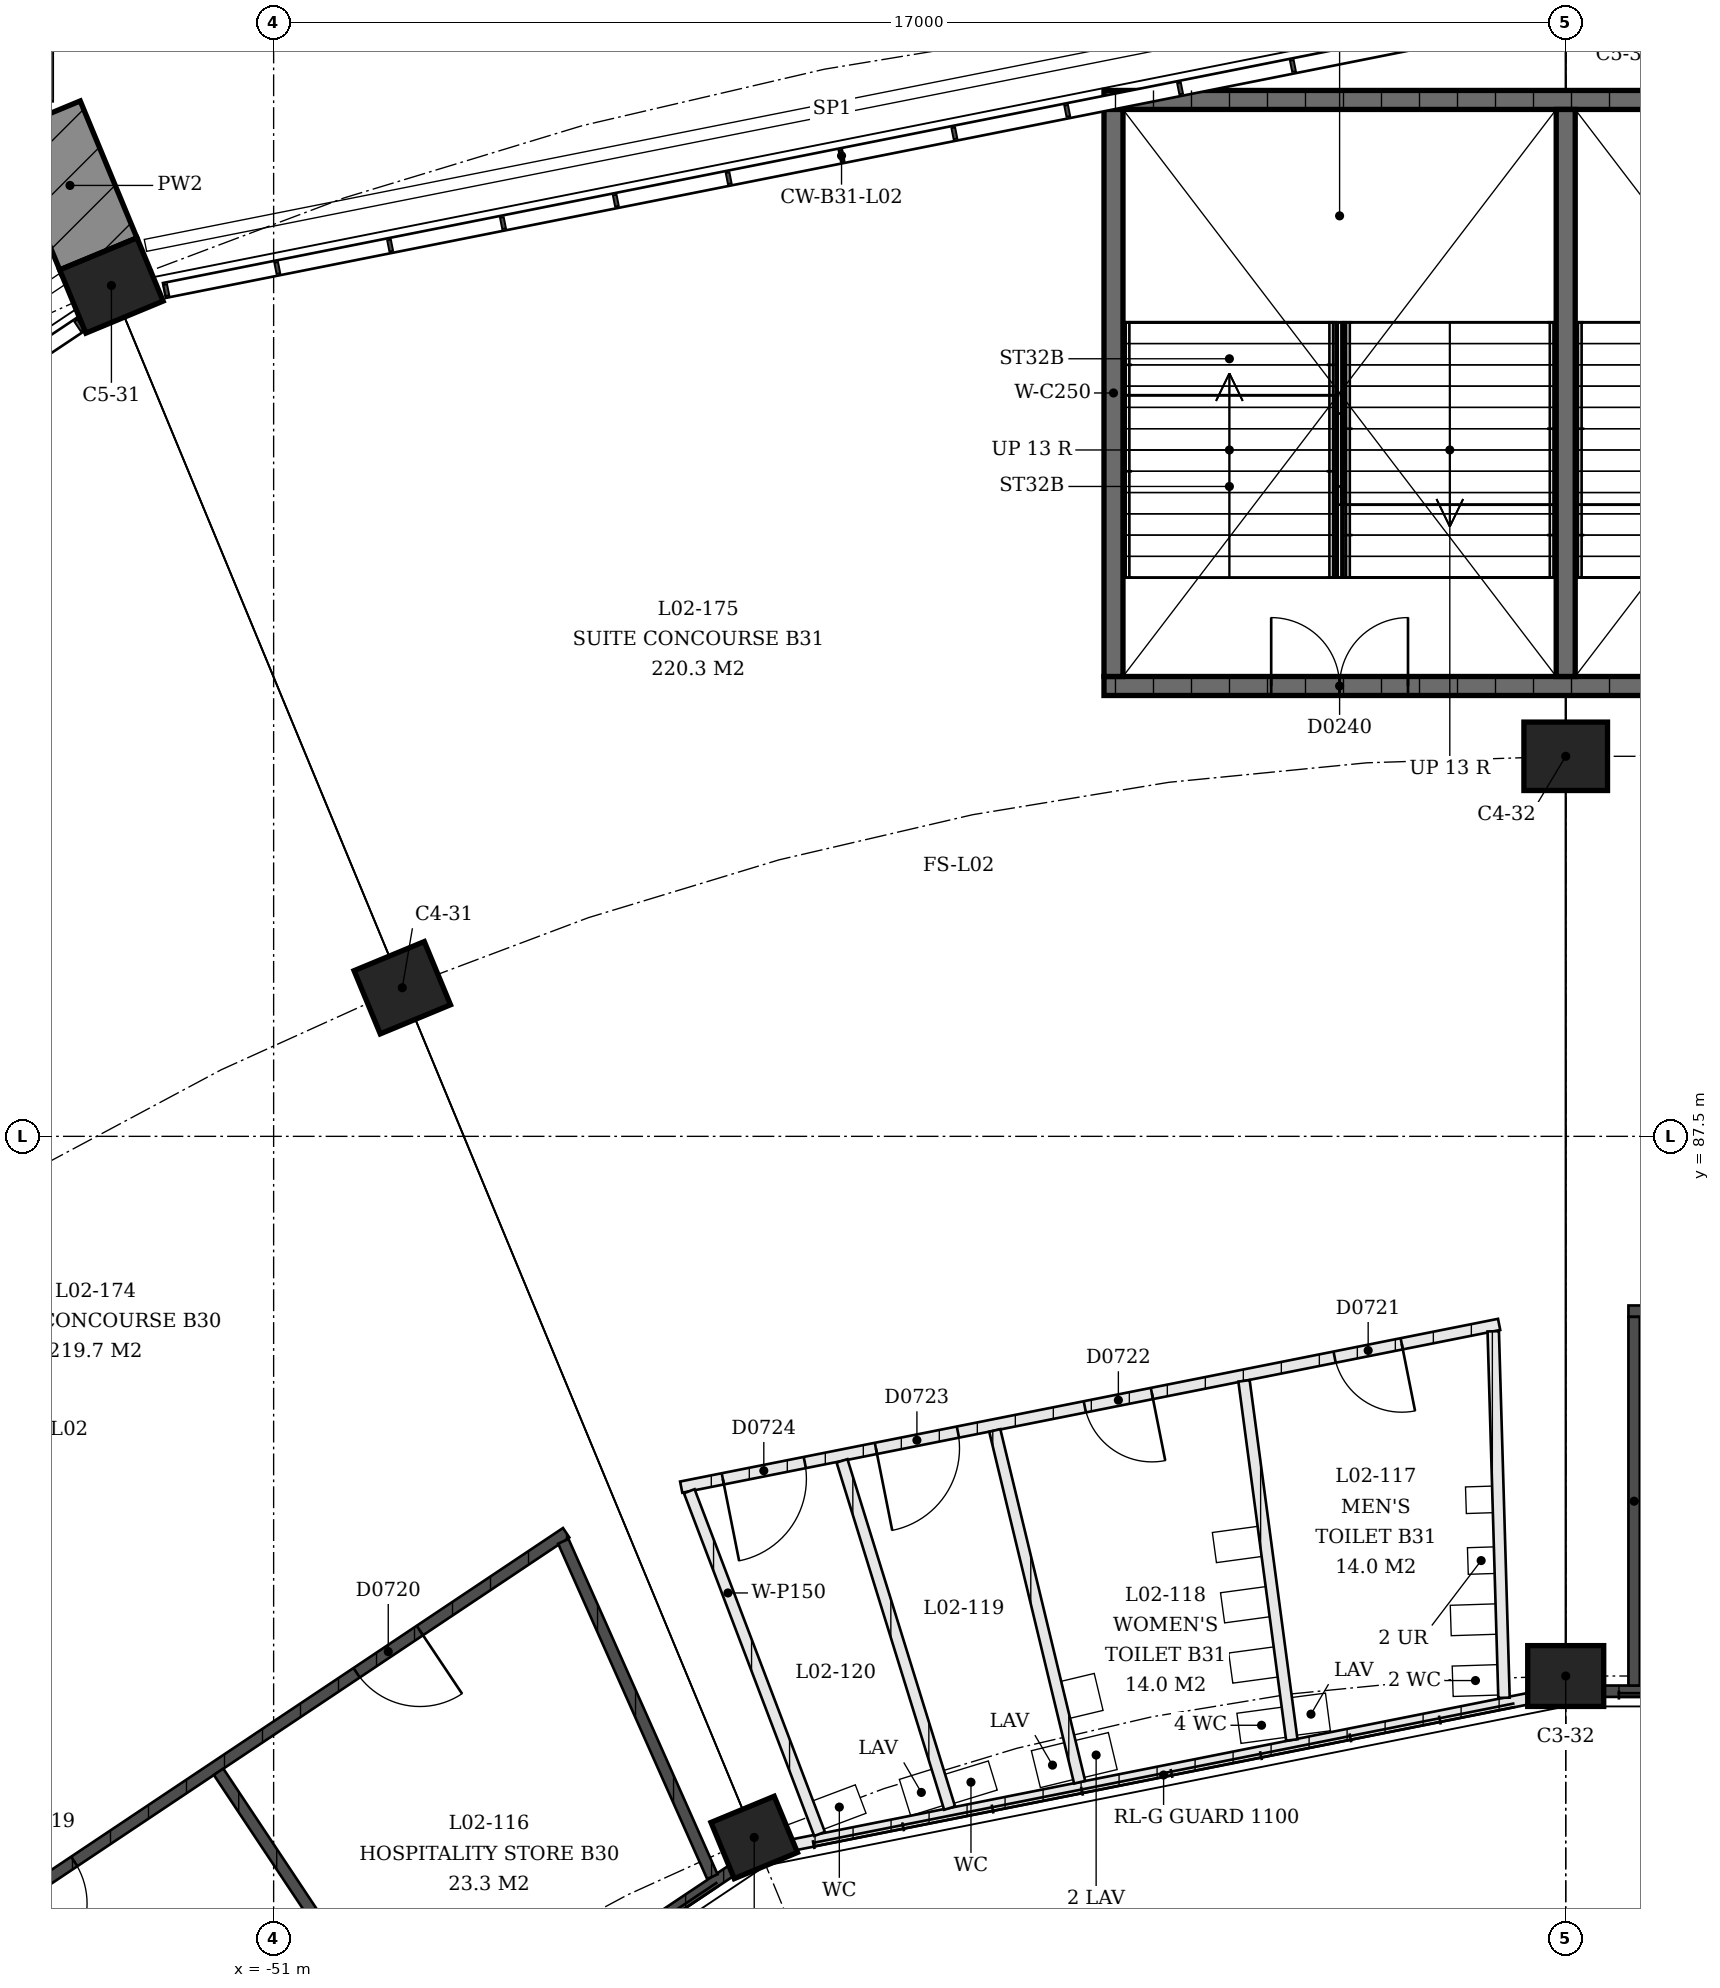
"""IFC4 building model, lengths in metres.
Left out: names, types, materials, properties, quantities, classifications, styles, units other than length and angle.
Written with IfcOpenShell. Run it as: python <this file> out.ifc"""

import sys

from ifc_helpers import new_model, si_unit, direction, frame, frame_2d, origin, origin_2d, place, context, subcontext, project, spatial, rectangle, extrude, element, fill, save


model = new_model("IFC4")
c1 = context("Model", 3, precision=1e-05, world=origin(), true_north=direction((0.0, 1.0)))
c2 = subcontext(c1, "Body", "Model", "MODEL_VIEW")
j1 = project(units=[si_unit("LENGTHUNIT", "METRE"), si_unit("PLANEANGLEUNIT", "RADIAN")], contexts=[c1])
p1 = place(None, origin())
s1 = spatial("IfcSite", under=j1, at=p1, CompositionType="ELEMENT")
p2 = place(p1, origin())
s2 = spatial("IfcBuilding", under=s1, at=p2, CompositionType="ELEMENT")
p3 = place(p2, frame((0.0, 0.0, 9.0)))
s3 = spatial("IfcBuildingStorey", under=s2, at=p3, CompositionType="ELEMENT", Elevation=9.0)
p4 = place(p3, frame((-44.677, 78.276, 0.0), z_axis=(0.0, 0.0, 1.0), x_axis=(-0.923879532511, -0.382683432365, 0.0)))
e1 = element("IfcColumn", 1, at=p4, inside=s3, PredefinedType="COLUMN", context=c2, shape_type="SweptSolid", body=[
    extrude(rectangle(XDim=0.9, YDim=0.8, at=origin_2d()), origin(), (0.0, 0.0, 1.0), 4.5),
])
p5 = place(p3, frame((-49.307, 89.455, 0.0), z_axis=(0.0, 0.0, 1.0), x_axis=(-0.923879532511, -0.382683432365, 0.0)))
e2 = element("IfcColumn", 2, at=p5, inside=s3, PredefinedType="COLUMN", context=c2, shape_type="SweptSolid", body=[
    extrude(rectangle(XDim=1.0, YDim=0.9, at=origin_2d()), origin(), (0.0, 0.0, 1.0), 4.5),
])
p6 = place(p3, frame((-53.134, 98.694, 0.0), z_axis=(0.0, 0.0, 1.0), x_axis=(-0.923879532511, -0.382683432365, 0.0)))
e3 = element("IfcColumn", 3, at=p6, inside=s3, PredefinedType="COLUMN", context=c2, shape_type="SweptSolid", body=[
    extrude(rectangle(XDim=1.1, YDim=0.9, at=origin_2d()), origin(), (0.0, 0.0, 1.0), 4.5),
])
p7 = place(p3, frame((-34.0, 80.4, 0.0), z_axis=(0.0, 0.0, 1.0), x_axis=(-1.0, 0.0, 0.0)))
e4 = element("IfcColumn", 4, at=p7, inside=s3, PredefinedType="COLUMN", context=c2, shape_type="SweptSolid", body=[
    extrude(rectangle(XDim=1.0, YDim=0.8, at=origin_2d()), origin(), (0.0, 0.0, 1.0), 4.5),
])
p8 = place(p3, frame((-34.0, 92.5, 0.0), z_axis=(0.0, 0.0, 1.0), x_axis=(-1.0, 0.0, 0.0)))
e5 = element("IfcColumn", 5, at=p8, inside=s3, PredefinedType="COLUMN", context=c2, shape_type="SweptSolid", body=[
    extrude(rectangle(XDim=1.1, YDim=0.9, at=origin_2d()), origin(), (0.0, 0.0, 1.0), 4.5),
])
p9 = place(p3, frame((-27.925, 93.425, 0.0), z_axis=(0.0, 0.0, 1.0), x_axis=(-1.0, 0.0, 0.0)))
e6 = element("IfcWall", 6, at=p9, inside=s3, PredefinedType="SHEAR", context=c2, shape_type="SweptSolid", body=[
    extrude(rectangle(XDim=12.15, YDim=0.25, at=frame_2d((6.075, 0.0))), origin(), (0.0, 0.0, 1.0), 4.09),
])
p10 = place(p9, frame((2.2, 0.0, 0.0)))
e7 = element("IfcOpeningElement", 7, at=p10, cuts=e6, PredefinedType="OPENING", context=c2, shape_type="SweptSolid", body=[
    extrude(rectangle(XDim=1.8, YDim=2.1, at=frame_2d((0.9, 1.05))), frame((0.0, 0.125, 0.0), z_axis=(0.0, -1.0, 0.0), x_axis=(1.0, 0.0, 0.0)), (0.0, 0.0, 1.0), 0.25),
])
p11 = place(p9, frame((8.15, 0.0, 0.0)))
e8 = element("IfcOpeningElement", 8, at=p11, cuts=e6, PredefinedType="OPENING", context=c2, shape_type="SweptSolid", body=[
    extrude(rectangle(XDim=1.8, YDim=2.1, at=frame_2d((0.9, 1.05))), frame((0.0, 0.125, 0.0), z_axis=(0.0, -1.0, 0.0), x_axis=(1.0, 0.0, 0.0)), (0.0, 0.0, 1.0), 0.25),
])
p12 = place(p3, frame((-27.925, 101.135, 0.0), z_axis=(0.0, 0.0, 1.0), x_axis=(-1.0, 0.0, 0.0)))
e9 = element("IfcWall", 9, at=p12, inside=s3, PredefinedType="SHEAR", context=c2, shape_type="SweptSolid", body=[
    extrude(rectangle(XDim=12.15, YDim=0.25, at=frame_2d((6.075, 0.0))), origin(), (0.0, 0.0, 1.0), 4.09),
])
for number, where, z_axis, x_axis in (
    (10, (-39.95, 93.55, 0.0), (0.0, 0.0, 1.0), (0.0, 1.0, 0.0)),
    (11, (-34.0, 93.55, 0.0), (0.0, 0.0, 1.0), (0.0, 1.0, 0.0)),
):
    element("IfcWall", number, at=place(p3, frame(where, z_axis=z_axis, x_axis=x_axis)), inside=s3, PredefinedType="SHEAR", context=c2, shape_type="SweptSolid", body=[
        extrude(rectangle(XDim=7.46, YDim=0.25, at=frame_2d((3.73, 0.0))), origin(), (0.0, 0.0, 1.0), 4.09),
    ])
p13 = place(p3, frame((-53.205, 72.342, 0.0), z_axis=(0.0, 0.0, 1.0), x_axis=(0.831461186136, 0.555582843463, 0.0)))
e12 = element("IfcWall", 12, at=p13, inside=s3, PredefinedType="SOLIDWALL", context=c2, shape_type="SweptSolid", body=[
    extrude(rectangle(XDim=9.89, YDim=0.15, at=frame_2d((4.945, 0.0))), origin(), (0.0, 0.0, 1.0), 3.0),
])
p14 = place(p3, frame((-56.38, 76.119, 0.0), z_axis=(0.0, 0.0, 1.0), x_axis=(0.831471162003, 0.555567913722, 0.0)))
e13 = element("IfcWall", 13, at=p14, inside=s3, PredefinedType="SOLIDWALL", context=c2, shape_type="SweptSolid", body=[
    extrude(rectangle(XDim=11.099, YDim=0.15, at=frame_2d((5.55, 0.0))), origin(), (0.0, 0.0, 1.0), 3.0),
])
p15 = place(p14, frame((2.315, 0.0, 0.0)))
e14 = element("IfcOpeningElement", 14, at=p15, cuts=e13, PredefinedType="OPENING", context=c2, shape_type="SweptSolid", body=[
    extrude(rectangle(XDim=1.0, YDim=2.1, at=frame_2d((0.5, 1.05))), frame((0.0, 0.075, 0.0), z_axis=(0.0, -1.0, 0.0), x_axis=(1.0, 0.0, 0.0)), (0.0, 0.0, 1.0), 0.15),
])
p16 = place(p14, frame((7.784, 0.0, 0.0)))
e15 = element("IfcOpeningElement", 15, at=p16, cuts=e13, PredefinedType="OPENING", context=c2, shape_type="SweptSolid", body=[
    extrude(rectangle(XDim=1.0, YDim=2.1, at=frame_2d((0.5, 1.05))), frame((0.0, 0.075, 0.0), z_axis=(0.0, -1.0, 0.0), x_axis=(1.0, 0.0, 0.0)), (0.0, 0.0, 1.0), 0.15),
])
p17 = place(p3, frame((-49.09, 75.18, 0.0), z_axis=(0.0, 0.0, 1.0), x_axis=(-0.553930112441, 0.832563169093, 0.0)))
e16 = element("IfcWall", 16, at=p17, inside=s3, PredefinedType="SOLIDWALL", context=c2, shape_type="SweptSolid", body=[
    extrude(rectangle(XDim=4.757, YDim=0.15, at=frame_2d((2.378, 0.0))), origin(), (0.0, 0.0, 1.0), 3.0),
])
p18 = place(p3, frame((-45.228, 77.761, 0.0), z_axis=(0.0, 0.0, 1.0), x_axis=(-0.406147851791, 0.913807377124, 0.0)))
e17 = element("IfcWall", 17, at=p18, inside=s3, PredefinedType="SOLIDWALL", context=c2, shape_type="SweptSolid", body=[
    extrude(rectangle(XDim=4.827, YDim=0.15, at=frame_2d((2.414, 0.0))), origin(), (0.0, 0.0, 1.0), 3.0),
])
p19 = place(p3, frame((-34.5, 80.101, 0.0), z_axis=(0.0, 0.0, 1.0), x_axis=(-0.980783419557, -0.195099676887, 0.0)))
e18 = element("IfcWall", 18, at=p19, inside=s3, PredefinedType="PARTITIONING", context=c2, shape_type="SweptSolid", body=[
    extrude(rectangle(XDim=9.839, YDim=0.15, at=frame_2d((4.92, 0.0))), origin(), (0.0, 0.0, 1.0), 3.0),
])
p20 = place(p3, frame((-34.876, 85.026, 0.0), z_axis=(0.0, 0.0, 1.0), x_axis=(-0.980788934186, -0.195071952313, 0.0)))
e19 = element("IfcWall", 19, at=p20, inside=s3, PredefinedType="PARTITIONING", context=c2, shape_type="SweptSolid", body=[
    extrude(rectangle(XDim=10.972, YDim=0.15, at=frame_2d((5.486, 0.0))), origin(), (0.0, 0.0, 1.0), 3.0),
])
p21 = place(p20, frame((1.307, 0.0, 0.0)))
e20 = element("IfcOpeningElement", 20, at=p21, cuts=e19, PredefinedType="OPENING", context=c2, shape_type="SweptSolid", body=[
    extrude(rectangle(XDim=0.9, YDim=2.1, at=frame_2d((0.45, 1.05))), frame((0.0, 0.075, 0.0), z_axis=(0.0, -1.0, 0.0), x_axis=(1.0, 0.0, 0.0)), (0.0, 0.0, 1.0), 0.15),
])
p22 = place(p20, frame((4.658, 0.0, 0.0)))
e21 = element("IfcOpeningElement", 21, at=p22, cuts=e19, PredefinedType="OPENING", context=c2, shape_type="SweptSolid", body=[
    extrude(rectangle(XDim=0.9, YDim=2.1, at=frame_2d((0.45, 1.05))), frame((0.0, 0.075, 0.0), z_axis=(0.0, -1.0, 0.0), x_axis=(1.0, 0.0, 0.0)), (0.0, 0.0, 1.0), 0.15),
])
p23 = place(p20, frame((7.26, 0.0, 0.0)))
e22 = element("IfcOpeningElement", 22, at=p23, cuts=e19, PredefinedType="OPENING", context=c2, shape_type="SweptSolid", body=[
    extrude(rectangle(XDim=1.1, YDim=2.1, at=frame_2d((0.55, 1.05))), frame((0.0, 0.075, 0.0), z_axis=(0.0, -1.0, 0.0), x_axis=(1.0, 0.0, 0.0)), (0.0, 0.0, 1.0), 0.15),
])
p24 = place(p20, frame((9.314, 0.0, 0.0)))
e23 = element("IfcOpeningElement", 23, at=p24, cuts=e19, PredefinedType="OPENING", context=c2, shape_type="SweptSolid", body=[
    extrude(rectangle(XDim=1.1, YDim=2.1, at=frame_2d((0.55, 1.05))), frame((0.0, 0.075, 0.0), z_axis=(0.0, -1.0, 0.0), x_axis=(1.0, 0.0, 0.0)), (0.0, 0.0, 1.0), 0.15),
])
p25 = place(p3, frame((-34.812, 80.114, 0.0), z_axis=(0.0, 0.0, 1.0), x_axis=(-0.029405000692, 0.999567579473, 0.0)))
e24 = element("IfcWall", 24, at=p25, inside=s3, PredefinedType="PARTITIONING", context=c2, shape_type="SweptSolid", body=[
    extrude(rectangle(XDim=4.824, YDim=0.15, at=frame_2d((2.412, 0.0))), origin(), (0.0, 0.0, 1.0), 3.0),
])
p26 = place(p3, frame((-37.604, 79.558, 0.0), z_axis=(0.0, 0.0, 1.0), x_axis=(-0.131992613728, 0.991250699834, 0.0)))
e25 = element("IfcWall", 25, at=p26, inside=s3, PredefinedType="PARTITIONING", context=c2, shape_type="SweptSolid", body=[
    extrude(rectangle(XDim=4.767, YDim=0.15, at=frame_2d((2.383, 0.0))), origin(), (0.0, 0.0, 1.0), 3.0),
])
p27 = place(p3, frame((-40.395, 79.003, 0.0), z_axis=(0.0, 0.0, 1.0), x_axis=(-0.234563667056, 0.972100759231, 0.0)))
e26 = element("IfcWall", 26, at=p27, inside=s3, PredefinedType="PARTITIONING", context=c2, shape_type="SweptSolid", body=[
    extrude(rectangle(XDim=4.761, YDim=0.15, at=frame_2d((2.38, 0.0))), origin(), (0.0, 0.0, 1.0), 3.0),
])
p28 = place(p3, frame((-42.106, 78.663, 0.0), z_axis=(0.0, 0.0, 1.0), x_axis=(-0.295972093403, 0.955196587058, 0.0)))
e27 = element("IfcWall", 27, at=p28, inside=s3, PredefinedType="PARTITIONING", context=c2, shape_type="SweptSolid", body=[
    extrude(rectangle(XDim=4.783, YDim=0.15, at=frame_2d((2.391, 0.0))), origin(), (0.0, 0.0, 1.0), 3.0),
])
p29 = place(p3, frame((-43.817, 78.322, 0.0), z_axis=(0.0, 0.0, 1.0), x_axis=(-0.35538492255, 0.934720041951, 0.0)))
e28 = element("IfcWall", 28, at=p29, inside=s3, PredefinedType="PARTITIONING", context=c2, shape_type="SweptSolid", body=[
    extrude(rectangle(XDim=4.824, YDim=0.15, at=frame_2d((2.412, 0.0))), origin(), (0.0, 0.0, 1.0), 3.0),
])
p30 = place(p3, frame((-33.5, 80.2, 0.0), z_axis=(0.0, 0.0, 1.0), x_axis=(1.0, 0.0, 0.0)))
e29 = element("IfcWall", 29, at=p30, inside=s3, PredefinedType="SOLIDWALL", context=c2, shape_type="SweptSolid", body=[
    extrude(rectangle(XDim=12.275, YDim=0.15, at=frame_2d((6.137, 0.0))), origin(), (0.0, 0.0, 1.0), 3.0),
])
p31 = place(p3, frame((-33.175, 85.2, 0.0), z_axis=(0.0, 0.0, 1.0), x_axis=(1.0, 0.0, 0.0)))
e30 = element("IfcWall", 30, at=p31, inside=s3, PredefinedType="SOLIDWALL", context=c2, shape_type="SweptSolid", body=[
    extrude(rectangle(XDim=11.95, YDim=0.15, at=frame_2d((5.975, 0.0))), origin(), (0.0, 0.0, 1.0), 3.0),
])
p32 = place(p31, frame((2.525, 0.0, 0.0)))
e31 = element("IfcOpeningElement", 31, at=p32, cuts=e30, PredefinedType="OPENING", context=c2, shape_type="SweptSolid", body=[
    extrude(rectangle(XDim=1.0, YDim=2.1, at=frame_2d((0.5, 1.05))), frame((0.0, 0.075, 0.0), z_axis=(0.0, -1.0, 0.0), x_axis=(1.0, 0.0, 0.0)), (0.0, 0.0, 1.0), 0.15),
])
p33 = place(p31, frame((8.425, 0.0, 0.0)))
e32 = element("IfcOpeningElement", 32, at=p33, cuts=e30, PredefinedType="OPENING", context=c2, shape_type="SweptSolid", body=[
    extrude(rectangle(XDim=1.0, YDim=2.1, at=frame_2d((0.5, 1.05))), frame((0.0, 0.075, 0.0), z_axis=(0.0, -1.0, 0.0), x_axis=(1.0, 0.0, 0.0)), (0.0, 0.0, 1.0), 0.15),
])
p34 = place(p3, frame((-33.1, 80.275, 0.0), z_axis=(0.0, 0.0, 1.0), x_axis=(0.0, 1.0, 0.0)))
e33 = element("IfcWall", 33, at=p34, inside=s3, PredefinedType="SOLIDWALL", context=c2, shape_type="SweptSolid", body=[
    extrude(rectangle(XDim=4.85, YDim=0.15, at=frame_2d((2.425, 0.0))), origin(), (0.0, 0.0, 1.0), 3.0),
])
p35 = place(p11, origin())
e34 = element("IfcDoor", 34, at=p35, inside=s3, OperationType="DOUBLE_DOOR_SINGLE_SWING", PredefinedType="DOOR", context=c2, shape_type="SweptSolid", body=[
    extrude(rectangle(XDim=1.8, YDim=2.1, at=frame_2d((0.9, 1.05))), frame((0.0, 0.025, 0.0), z_axis=(0.0, -1.0, 0.0), x_axis=(1.0, 0.0, 0.0)), (0.0, 0.0, 1.0), 0.05),
])
fill(e8, e34)
p36 = place(p15, origin())
e35 = element("IfcDoor", 35, at=p36, inside=s3, OperationType="SINGLE_SWING_LEFT", PredefinedType="DOOR", context=c2, shape_type="SweptSolid", body=[
    extrude(rectangle(XDim=1.0, YDim=2.1, at=frame_2d((0.5, 1.05))), frame((0.0, 0.025, 0.0), z_axis=(0.0, -1.0, 0.0), x_axis=(1.0, 0.0, 0.0)), (0.0, 0.0, 1.0), 0.05),
])
fill(e14, e35)
p37 = place(p16, origin())
e36 = element("IfcDoor", 36, at=p37, inside=s3, OperationType="SINGLE_SWING_RIGHT", PredefinedType="DOOR", context=c2, shape_type="SweptSolid", body=[
    extrude(rectangle(XDim=1.0, YDim=2.1, at=frame_2d((0.5, 1.05))), frame((0.0, 0.025, 0.0), z_axis=(0.0, -1.0, 0.0), x_axis=(1.0, 0.0, 0.0)), (0.0, 0.0, 1.0), 0.05),
])
fill(e15, e36)
p38 = place(p21, origin())
e37 = element("IfcDoor", 37, at=p38, inside=s3, OperationType="SINGLE_SWING_RIGHT", PredefinedType="DOOR", context=c2, shape_type="SweptSolid", body=[
    extrude(rectangle(XDim=0.9, YDim=2.1, at=frame_2d((0.45, 1.05))), frame((0.0, 0.025, 0.0), z_axis=(0.0, -1.0, 0.0), x_axis=(1.0, 0.0, 0.0)), (0.0, 0.0, 1.0), 0.05),
])
fill(e20, e37)
p39 = place(p22, origin())
e38 = element("IfcDoor", 38, at=p39, inside=s3, OperationType="SINGLE_SWING_RIGHT", PredefinedType="DOOR", context=c2, shape_type="SweptSolid", body=[
    extrude(rectangle(XDim=0.9, YDim=2.1, at=frame_2d((0.45, 1.05))), frame((0.0, 0.025, 0.0), z_axis=(0.0, -1.0, 0.0), x_axis=(1.0, 0.0, 0.0)), (0.0, 0.0, 1.0), 0.05),
])
fill(e21, e38)
p40 = place(p23, origin())
e39 = element("IfcDoor", 39, at=p40, inside=s3, OperationType="SINGLE_SWING_LEFT", PredefinedType="DOOR", context=c2, shape_type="SweptSolid", body=[
    extrude(rectangle(XDim=1.1, YDim=2.1, at=frame_2d((0.55, 1.05))), frame((0.0, 0.025, 0.0), z_axis=(0.0, -1.0, 0.0), x_axis=(1.0, 0.0, 0.0)), (0.0, 0.0, 1.0), 0.05),
])
fill(e22, e39)
p41 = place(p24, origin())
e40 = element("IfcDoor", 40, at=p41, inside=s3, OperationType="SINGLE_SWING_LEFT", PredefinedType="DOOR", context=c2, shape_type="SweptSolid", body=[
    extrude(rectangle(XDim=1.1, YDim=2.1, at=frame_2d((0.55, 1.05))), frame((0.0, 0.025, 0.0), z_axis=(0.0, -1.0, 0.0), x_axis=(1.0, 0.0, 0.0)), (0.0, 0.0, 1.0), 0.05),
])
fill(e23, e40)
save(model, sys.argv[1])
